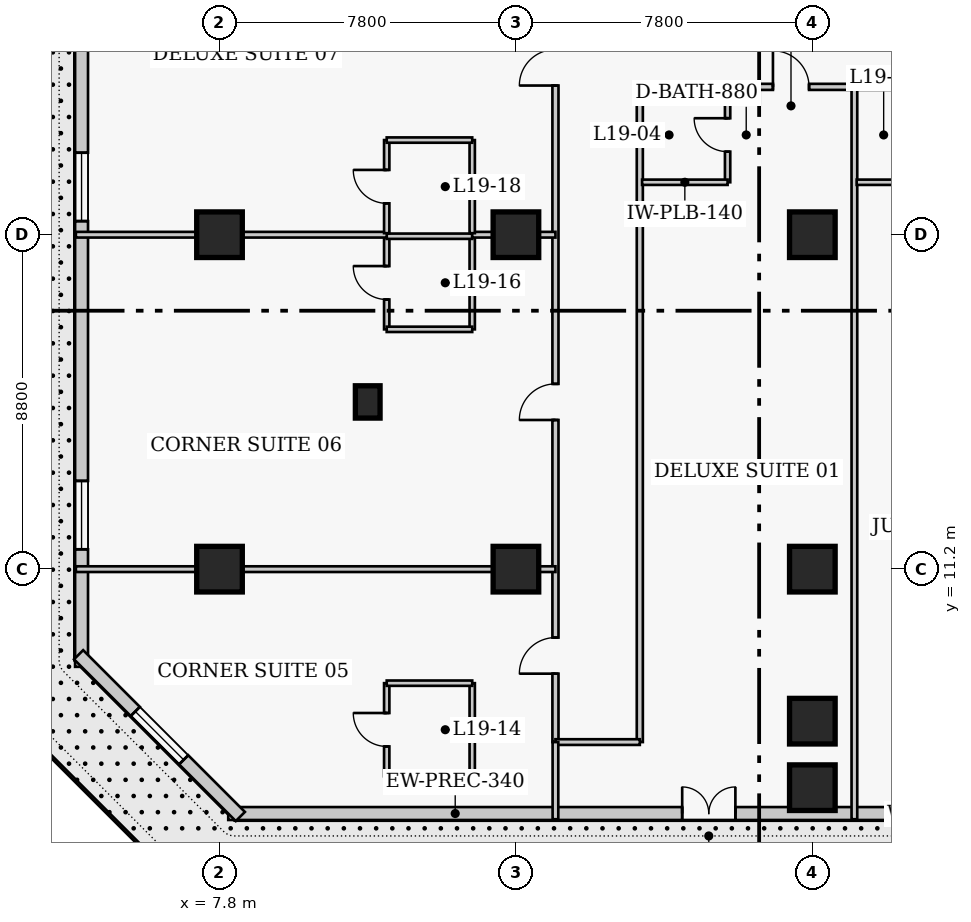
"""IFC4 building model, lengths in metres.
Left out: names, types, materials, properties, quantities, classifications, styles, units other than length and angle.
Written with IfcOpenShell. Run it as: python <this file> out.ifc"""

import sys

from ifc_helpers import new_model, si_unit, direction, frame, frame_2d, origin, origin_2d, place, context, subcontext, project, spatial, rectangle, extrude, element, fill, save


model = new_model("IFC4")
c1 = context("Model", 3, precision=1e-05, world=origin(), true_north=direction((0.0, 1.0)))
c2 = subcontext(c1, "Body", "Model", "MODEL_VIEW")
j1 = project(units=[si_unit("LENGTHUNIT", "METRE"), si_unit("PLANEANGLEUNIT", "RADIAN")], contexts=[c1])
p1 = place(None, origin())
s1 = spatial("IfcSite", under=j1, at=p1, CompositionType="ELEMENT")
p2 = place(p1, origin())
s2 = spatial("IfcBuilding", under=s1, at=p2, CompositionType="ELEMENT")
p3 = place(p2, frame((0.0, 0.0, 80.4)))
s3 = spatial("IfcBuildingStorey", under=s2, at=p3, CompositionType="ELEMENT", Elevation=80.4)
for number, where, z_axis, x_axis in (
    (1, (7.8, 11.2, 0.0), (0.0, 0.0, 1.0), (1.0, 0.0, 0.0)),
    (2, (7.8, 20.0, 0.0), (0.0, 0.0, 1.0), (1.0, 0.0, 0.0)),
    (3, (15.6, 11.2, 0.0), (0.0, 0.0, 1.0), (1.0, 0.0, 0.0)),
    (4, (15.6, 20.0, 0.0), (0.0, 0.0, 1.0), (1.0, 0.0, 0.0)),
    (5, (23.4, 11.2, 0.0), (0.0, 0.0, 1.0), (1.0, 0.0, 0.0)),
    (6, (23.4, 20.0, 0.0), (0.0, 0.0, 1.0), (1.0, 0.0, 0.0)),
    (7, (23.4, 7.2, 0.0), (0.0, 0.0, 1.0), (1.0, 0.0, 0.0)),
    (8, (23.4, 5.45, 0.0), (0.0, 0.0, 1.0), (1.0, 0.0, 0.0)),
):
    element("IfcColumn", number, at=place(p3, frame(where, z_axis=z_axis, x_axis=x_axis)), inside=s3, PredefinedType="COLUMN", context=c2, shape_type="SweptSolid", body=[
        extrude(rectangle(XDim=1.2, YDim=1.2, at=origin_2d()), origin(), (0.0, 0.0, 1.0), 3.8),
    ])
p4 = place(p3, frame((11.7, 15.6, 0.0), z_axis=(0.0, 0.0, 1.0), x_axis=(1.0, 0.0, 0.0)))
e9 = element("IfcColumn", 9, at=p4, inside=s3, PredefinedType="PILASTER", context=c2, shape_type="SweptSolid", body=[
    extrude(rectangle(XDim=0.65, YDim=0.85, at=origin_2d()), origin(), (0.0, 0.0, 1.0), 3.8),
])
p5 = place(p3, frame((8.03, 4.77, 0.0), z_axis=(0.0, 0.0, 1.0), x_axis=(1.0, 0.0, 0.0)))
e10 = element("IfcWall", 10, at=p5, inside=s3, PredefinedType="SOLIDWALL", context=c2, shape_type="SweptSolid", body=[
    extrude(rectangle(XDim=28.29, YDim=0.34, at=frame_2d((14.145, 0.0))), origin(), (0.0, 0.0, 1.0), 3.54),
])
p6 = place(p5, frame((11.945, 0.0, 0.0)))
e11 = element("IfcOpeningElement", 11, at=p6, cuts=e10, PredefinedType="OPENING", context=c2, shape_type="SweptSolid", body=[
    extrude(rectangle(XDim=1.4, YDim=2.15, at=frame_2d((0.7, 1.075))), frame((0.0, 0.18, 0.0), z_axis=(0.0, -1.0, 0.0), x_axis=(1.0, 0.0, 0.0)), (0.0, 0.0, 1.0), 0.36),
])
p7 = place(p5, frame((18.66, 0.0, 0.85)))
e12 = element("IfcOpeningElement", 12, at=p7, cuts=e10, PredefinedType="OPENING", context=c2, shape_type="SweptSolid", body=[
    extrude(rectangle(XDim=1.3, YDim=1.7, at=frame_2d((0.65, 0.85))), frame((0.0, 0.18, 0.0), z_axis=(0.0, -1.0, 0.0), x_axis=(1.0, 0.0, 0.0)), (0.0, 0.0, 1.0), 0.36),
])
p8 = place(p3, frame((4.17, 40.57, 0.0), z_axis=(0.0, 0.0, 1.0), x_axis=(0.0, -1.0, 0.0)))
e13 = element("IfcWall", 13, at=p8, inside=s3, PredefinedType="SOLIDWALL", context=c2, shape_type="SweptSolid", body=[
    extrude(rectangle(XDim=31.94, YDim=0.34, at=frame_2d((15.97, 0.0))), origin(), (0.0, 0.0, 1.0), 3.54),
])
p9 = place(p8, frame((4.242, 0.0, 0.85)))
e14 = element("IfcOpeningElement", 14, at=p9, cuts=e13, PredefinedType="OPENING", context=c2, shape_type="SweptSolid", body=[
    extrude(rectangle(XDim=1.8, YDim=1.8, at=frame_2d((0.9, 0.9))), frame((0.0, 0.18, 0.0), z_axis=(0.0, -1.0, 0.0), x_axis=(1.0, 0.0, 0.0)), (0.0, 0.0, 1.0), 0.36),
])
p10 = place(p8, frame((12.228, 0.0, 0.85)))
e15 = element("IfcOpeningElement", 15, at=p10, cuts=e13, PredefinedType="OPENING", context=c2, shape_type="SweptSolid", body=[
    extrude(rectangle(XDim=1.8, YDim=1.8, at=frame_2d((0.9, 0.9))), frame((0.0, 0.18, 0.0), z_axis=(0.0, -1.0, 0.0), x_axis=(1.0, 0.0, 0.0)), (0.0, 0.0, 1.0), 0.36),
])
p11 = place(p8, frame((18.413, 0.0, 0.85)))
e16 = element("IfcOpeningElement", 16, at=p11, cuts=e13, PredefinedType="OPENING", context=c2, shape_type="SweptSolid", body=[
    extrude(rectangle(XDim=1.8, YDim=1.8, at=frame_2d((0.9, 0.9))), frame((0.0, 0.18, 0.0), z_axis=(0.0, -1.0, 0.0), x_axis=(1.0, 0.0, 0.0)), (0.0, 0.0, 1.0), 0.36),
])
p12 = place(p8, frame((27.048, 0.0, 0.85)))
e17 = element("IfcOpeningElement", 17, at=p12, cuts=e13, PredefinedType="OPENING", context=c2, shape_type="SweptSolid", body=[
    extrude(rectangle(XDim=1.8, YDim=1.8, at=frame_2d((0.9, 0.9))), frame((0.0, 0.18, 0.0), z_axis=(0.0, -1.0, 0.0), x_axis=(1.0, 0.0, 0.0)), (0.0, 0.0, 1.0), 0.36),
])
p13 = place(p3, frame((4.092, 8.948, 0.0), z_axis=(0.0, 0.0, 1.0), x_axis=(0.707106781187, -0.707106781187, 0.0)))
e18 = element("IfcWall", 18, at=p13, inside=s3, PredefinedType="SOLIDWALL", context=c2, shape_type="SweptSolid", body=[
    extrude(rectangle(XDim=6.02, YDim=0.34, at=frame_2d((3.01, 0.0))), origin(), (0.0, 0.0, 1.0), 3.54),
])
p14 = place(p13, frame((2.11, 0.0, 0.85)))
e19 = element("IfcOpeningElement", 19, at=p14, cuts=e18, PredefinedType="OPENING", context=c2, shape_type="SweptSolid", body=[
    extrude(rectangle(XDim=1.8, YDim=1.8, at=frame_2d((0.9, 0.9))), frame((0.0, 0.18, 0.0), z_axis=(0.0, -1.0, 0.0), x_axis=(1.0, 0.0, 0.0)), (0.0, 0.0, 1.0), 0.36),
])
p15 = place(p3, frame((18.8, 23.89, 0.0), z_axis=(0.0, 0.0, 1.0), x_axis=(1.0, 0.0, 0.0)))
e20 = element("IfcWall", 20, at=p15, inside=s3, PredefinedType="PARTITIONING", context=c2, shape_type="SweptSolid", body=[
    extrude(rectangle(XDim=17.0, YDim=0.16, at=frame_2d((8.5, 0.0))), origin(), (0.0, 0.0, 1.0), 3.54),
])
p16 = place(p15, frame((3.563, 0.0, 0.0)))
e21 = element("IfcOpeningElement", 21, at=p16, cuts=e20, PredefinedType="OPENING", context=c2, shape_type="SweptSolid", body=[
    extrude(rectangle(XDim=0.95, YDim=2.1, at=frame_2d((0.475, 1.05))), frame((0.0, 0.09, 0.0), z_axis=(0.0, -1.0, 0.0), x_axis=(1.0, 0.0, 0.0)), (0.0, 0.0, 1.0), 0.18),
])
p17 = place(p15, frame((9.21, 0.0, 0.0)))
e22 = element("IfcOpeningElement", 22, at=p17, cuts=e20, PredefinedType="OPENING", context=c2, shape_type="SweptSolid", body=[
    extrude(rectangle(XDim=0.95, YDim=2.1, at=frame_2d((0.475, 1.05))), frame((0.0, 0.09, 0.0), z_axis=(0.0, -1.0, 0.0), x_axis=(1.0, 0.0, 0.0)), (0.0, 0.0, 1.0), 0.18),
])
p18 = place(p15, frame((13.677, 0.0, 0.0)))
e23 = element("IfcOpeningElement", 23, at=p18, cuts=e20, PredefinedType="OPENING", context=c2, shape_type="SweptSolid", body=[
    extrude(rectangle(XDim=1.0, YDim=2.15, at=frame_2d((0.5, 1.075))), frame((0.0, 0.09, 0.0), z_axis=(0.0, -1.0, 0.0), x_axis=(1.0, 0.0, 0.0)), (0.0, 0.0, 1.0), 0.18),
])
p19 = place(p3, frame((16.64, 6.65, 0.0), z_axis=(0.0, 0.0, 1.0), x_axis=(0.0, 1.0, 0.0)))
e24 = element("IfcWall", 24, at=p19, inside=s3, PredefinedType="PARTITIONING", context=c2, shape_type="SweptSolid", body=[
    extrude(rectangle(XDim=34.0, YDim=0.16, at=frame_2d((17.0, 0.0))), origin(), (0.0, 0.0, 1.0), 3.54),
])
p20 = place(p19, frame((1.8, 0.0, 0.0)))
e25 = element("IfcOpeningElement", 25, at=p20, cuts=e24, PredefinedType="OPENING", context=c2, shape_type="SweptSolid", body=[
    extrude(rectangle(XDim=0.95, YDim=2.1, at=frame_2d((0.475, 1.05))), frame((0.0, 0.09, 0.0), z_axis=(0.0, -1.0, 0.0), x_axis=(1.0, 0.0, 0.0)), (0.0, 0.0, 1.0), 0.18),
])
p21 = place(p19, frame((8.475, 0.0, 0.0)))
e26 = element("IfcOpeningElement", 26, at=p21, cuts=e24, PredefinedType="OPENING", context=c2, shape_type="SweptSolid", body=[
    extrude(rectangle(XDim=0.95, YDim=2.1, at=frame_2d((0.475, 1.05))), frame((0.0, 0.09, 0.0), z_axis=(0.0, -1.0, 0.0), x_axis=(1.0, 0.0, 0.0)), (0.0, 0.0, 1.0), 0.18),
])
p22 = place(p19, frame((17.275, 0.0, 0.0)))
e27 = element("IfcOpeningElement", 27, at=p22, cuts=e24, PredefinedType="OPENING", context=c2, shape_type="SweptSolid", body=[
    extrude(rectangle(XDim=0.95, YDim=2.1, at=frame_2d((0.475, 1.05))), frame((0.0, 0.09, 0.0), z_axis=(0.0, -1.0, 0.0), x_axis=(1.0, 0.0, 0.0)), (0.0, 0.0, 1.0), 0.18),
])
p23 = place(p19, frame((25.675, 0.0, 0.0)))
e28 = element("IfcOpeningElement", 28, at=p23, cuts=e24, PredefinedType="OPENING", context=c2, shape_type="SweptSolid", body=[
    extrude(rectangle(XDim=0.95, YDim=2.1, at=frame_2d((0.475, 1.05))), frame((0.0, 0.09, 0.0), z_axis=(0.0, -1.0, 0.0), x_axis=(1.0, 0.0, 0.0)), (0.0, 0.0, 1.0), 0.18),
])
p24 = place(p19, frame((32.56, 0.0, 0.0)))
e29 = element("IfcOpeningElement", 29, at=p24, cuts=e24, PredefinedType="OPENING", context=c2, shape_type="SweptSolid", body=[
    extrude(rectangle(XDim=1.0, YDim=2.15, at=frame_2d((0.5, 1.075))), frame((0.0, 0.09, 0.0), z_axis=(0.0, -1.0, 0.0), x_axis=(1.0, 0.0, 0.0)), (0.0, 0.0, 1.0), 0.18),
])
p25 = place(p3, frame((18.86, 6.65, 0.0), z_axis=(0.0, 0.0, 1.0), x_axis=(0.0, 1.0, 0.0)))
e30 = element("IfcWall", 30, at=p25, inside=s3, PredefinedType="PARTITIONING", context=c2, shape_type="SweptSolid", body=[
    extrude(rectangle(XDim=17.24, YDim=0.16, at=frame_2d((8.62, 0.0))), origin(), (0.0, 0.0, 1.0), 3.54),
])
p26 = place(p3, frame((16.64, 6.65, 0.0), z_axis=(0.0, 0.0, 1.0), x_axis=(1.0, 0.0, 0.0)))
e31 = element("IfcWall", 31, at=p26, inside=s3, PredefinedType="PARTITIONING", context=c2, shape_type="SweptSolid", body=[
    extrude(rectangle(XDim=2.22, YDim=0.15, at=frame_2d((1.11, 0.0))), origin(), (0.0, 0.0, 1.0), 3.54),
])
p27 = place(p3, frame((21.17, 21.38, 0.0), z_axis=(0.0, 0.0, 1.0), x_axis=(0.0, 1.0, 0.0)))
e32 = element("IfcWall", 32, at=p27, inside=s3, PredefinedType="PLUMBINGWALL", context=c2, shape_type="SweptSolid", body=[
    extrude(rectangle(XDim=2.49, YDim=0.14, at=frame_2d((1.245, 0.0))), origin(), (0.0, 0.0, 1.0), 3.54),
])
p28 = place(p27, frame((0.805, 0.0, 0.0)))
e33 = element("IfcOpeningElement", 33, at=p28, cuts=e32, PredefinedType="OPENING", context=c2, shape_type="SweptSolid", body=[
    extrude(rectangle(XDim=0.88, YDim=2.05, at=frame_2d((0.44, 1.025))), frame((0.0, 0.08, 0.0), z_axis=(0.0, -1.0, 0.0), x_axis=(1.0, 0.0, 0.0)), (0.0, 0.0, 1.0), 0.16),
])
p29 = place(p3, frame((18.92, 21.38, 0.0), z_axis=(0.0, 0.0, 1.0), x_axis=(1.0, 0.0, 0.0)))
e34 = element("IfcWall", 34, at=p29, inside=s3, PredefinedType="PLUMBINGWALL", context=c2, shape_type="SweptSolid", body=[
    extrude(rectangle(XDim=2.25, YDim=0.14, at=frame_2d((1.125, 0.0))), origin(), (0.0, 0.0, 1.0), 3.54),
])
p30 = place(p3, frame((24.507, 4.62, 0.0), z_axis=(0.0, 0.0, 1.0), x_axis=(0.0, 1.0, 0.0)))
e35 = element("IfcWall", 35, at=p30, inside=s3, PredefinedType="PARTITIONING", context=c2, shape_type="SweptSolid", body=[
    extrude(rectangle(XDim=19.27, YDim=0.15, at=frame_2d((9.635, 0.0))), origin(), (0.0, 0.0, 1.0), 3.54),
])
p31 = place(p3, frame((24.567, 21.38, 0.0), z_axis=(0.0, 0.0, 1.0), x_axis=(1.0, 0.0, 0.0)))
e36 = element("IfcWall", 36, at=p31, inside=s3, PredefinedType="PLUMBINGWALL", context=c2, shape_type="SweptSolid", body=[
    extrude(rectangle(XDim=2.25, YDim=0.14, at=frame_2d((1.125, 0.0))), origin(), (0.0, 0.0, 1.0), 3.54),
])
p32 = place(p3, frame((16.64, 4.62, 0.0), z_axis=(0.0, 0.0, 1.0), x_axis=(0.0, 1.0, 0.0)))
e37 = element("IfcWall", 37, at=p32, inside=s3, PredefinedType="PARTITIONING", context=c2, shape_type="SweptSolid", body=[
    extrude(rectangle(XDim=2.03, YDim=0.15, at=frame_2d((1.015, 0.0))), origin(), (0.0, 0.0, 1.0), 3.54),
])
p33 = place(p3, frame((12.2, 5.75, 0.0), z_axis=(0.0, 0.0, 1.0), x_axis=(0.0, 1.0, 0.0)))
e38 = element("IfcWall", 38, at=p33, inside=s3, PredefinedType="PLUMBINGWALL", context=c2, shape_type="SweptSolid", body=[
    extrude(rectangle(XDim=2.45, YDim=0.14, at=frame_2d((1.225, 0.0))), origin(), (0.0, 0.0, 1.0), 3.54),
])
p34 = place(p33, frame((0.785, 0.0, 0.0)))
e39 = element("IfcOpeningElement", 39, at=p34, cuts=e38, PredefinedType="OPENING", context=c2, shape_type="SweptSolid", body=[
    extrude(rectangle(XDim=0.88, YDim=2.05, at=frame_2d((0.44, 1.025))), frame((0.0, 0.08, 0.0), z_axis=(0.0, -1.0, 0.0), x_axis=(1.0, 0.0, 0.0)), (0.0, 0.0, 1.0), 0.16),
])
p35 = place(p3, frame((14.45, 5.75, 0.0), z_axis=(0.0, 0.0, 1.0), x_axis=(0.0, 1.0, 0.0)))
e40 = element("IfcWall", 40, at=p35, inside=s3, PredefinedType="PLUMBINGWALL", context=c2, shape_type="SweptSolid", body=[
    extrude(rectangle(XDim=2.45, YDim=0.14, at=frame_2d((1.225, 0.0))), origin(), (0.0, 0.0, 1.0), 3.54),
])
for number, where, z_axis, x_axis in (
    (41, (12.2, 5.75, 0.0), (0.0, 0.0, 1.0), (1.0, 0.0, 0.0)),
    (42, (12.2, 8.2, 0.0), (0.0, 0.0, 1.0), (1.0, 0.0, 0.0)),
):
    element("IfcWall", number, at=place(p3, frame(where, z_axis=z_axis, x_axis=x_axis)), inside=s3, PredefinedType="PLUMBINGWALL", context=c2, shape_type="SweptSolid", body=[
        extrude(rectangle(XDim=2.25, YDim=0.14, at=frame_2d((1.125, 0.0))), origin(), (0.0, 0.0, 1.0), 3.54),
    ])
p36 = place(p3, frame((4.02, 11.2, 0.0), z_axis=(0.0, 0.0, 1.0), x_axis=(1.0, 0.0, 0.0)))
e43 = element("IfcWall", 43, at=p36, inside=s3, PredefinedType="PARTITIONING", context=c2, shape_type="SweptSolid", body=[
    extrude(rectangle(XDim=12.62, YDim=0.15, at=frame_2d((6.31, 0.0))), origin(), (0.0, 0.0, 1.0), 2.679),
])
p37 = place(p3, frame((12.2, 17.51, 0.0), z_axis=(0.0, 0.0, 1.0), x_axis=(0.0, 1.0, 0.0)))
e44 = element("IfcWall", 44, at=p37, inside=s3, PredefinedType="PLUMBINGWALL", context=c2, shape_type="SweptSolid", body=[
    extrude(rectangle(XDim=2.45, YDim=0.14, at=frame_2d((1.225, 0.0))), origin(), (0.0, 0.0, 1.0), 3.54),
])
p38 = place(p37, frame((0.785, 0.0, 0.0)))
e45 = element("IfcOpeningElement", 45, at=p38, cuts=e44, PredefinedType="OPENING", context=c2, shape_type="SweptSolid", body=[
    extrude(rectangle(XDim=0.88, YDim=2.05, at=frame_2d((0.44, 1.025))), frame((0.0, 0.08, 0.0), z_axis=(0.0, -1.0, 0.0), x_axis=(1.0, 0.0, 0.0)), (0.0, 0.0, 1.0), 0.16),
])
p39 = place(p3, frame((14.45, 17.51, 0.0), z_axis=(0.0, 0.0, 1.0), x_axis=(0.0, 1.0, 0.0)))
e46 = element("IfcWall", 46, at=p39, inside=s3, PredefinedType="PLUMBINGWALL", context=c2, shape_type="SweptSolid", body=[
    extrude(rectangle(XDim=2.45, YDim=0.14, at=frame_2d((1.225, 0.0))), origin(), (0.0, 0.0, 1.0), 3.54),
])
p40 = place(p3, frame((12.2, 17.51, 0.0), z_axis=(0.0, 0.0, 1.0), x_axis=(1.0, 0.0, 0.0)))
e47 = element("IfcWall", 47, at=p40, inside=s3, PredefinedType="PLUMBINGWALL", context=c2, shape_type="SweptSolid", body=[
    extrude(rectangle(XDim=2.25, YDim=0.14, at=frame_2d((1.125, 0.0))), origin(), (0.0, 0.0, 1.0), 3.54),
])
p41 = place(p3, frame((12.2, 19.96, 0.0), z_axis=(0.0, 0.0, 1.0), x_axis=(1.0, 0.0, 0.0)))
e48 = element("IfcWall", 48, at=p41, inside=s3, PredefinedType="PLUMBINGWALL", context=c2, shape_type="SweptSolid", body=[
    extrude(rectangle(XDim=2.25, YDim=0.14, at=frame_2d((1.125, 0.0))), origin(), (0.0, 0.0, 1.0), 2.679),
])
p42 = place(p3, frame((4.02, 20.0, 0.0), z_axis=(0.0, 0.0, 1.0), x_axis=(1.0, 0.0, 0.0)))
e49 = element("IfcWall", 49, at=p42, inside=s3, PredefinedType="PARTITIONING", context=c2, shape_type="SweptSolid", body=[
    extrude(rectangle(XDim=8.18, YDim=0.15, at=frame_2d((4.09, 0.0))), origin(), (0.0, 0.0, 1.0), 2.679),
])
p43 = place(p3, frame((14.45, 20.0, 0.0), z_axis=(0.0, 0.0, 1.0), x_axis=(1.0, 0.0, 0.0)))
e50 = element("IfcWall", 50, at=p43, inside=s3, PredefinedType="PARTITIONING", context=c2, shape_type="SweptSolid", body=[
    extrude(rectangle(XDim=2.19, YDim=0.15, at=frame_2d((1.095, 0.0))), origin(), (0.0, 0.0, 1.0), 2.679),
])
p44 = place(p3, frame((12.2, 20.04, 0.0), z_axis=(0.0, 0.0, 1.0), x_axis=(0.0, 1.0, 0.0)))
e51 = element("IfcWall", 51, at=p44, inside=s3, PredefinedType="PLUMBINGWALL", context=c2, shape_type="SweptSolid", body=[
    extrude(rectangle(XDim=2.45, YDim=0.14, at=frame_2d((1.225, 0.0))), origin(), (0.0, 0.0, 1.0), 3.54),
])
p45 = place(p44, frame((0.785, 0.0, 0.0)))
e52 = element("IfcOpeningElement", 52, at=p45, cuts=e51, PredefinedType="OPENING", context=c2, shape_type="SweptSolid", body=[
    extrude(rectangle(XDim=0.88, YDim=2.05, at=frame_2d((0.44, 1.025))), frame((0.0, 0.08, 0.0), z_axis=(0.0, -1.0, 0.0), x_axis=(1.0, 0.0, 0.0)), (0.0, 0.0, 1.0), 0.16),
])
p46 = place(p3, frame((14.45, 20.04, 0.0), z_axis=(0.0, 0.0, 1.0), x_axis=(0.0, 1.0, 0.0)))
e53 = element("IfcWall", 53, at=p46, inside=s3, PredefinedType="PLUMBINGWALL", context=c2, shape_type="SweptSolid", body=[
    extrude(rectangle(XDim=2.45, YDim=0.14, at=frame_2d((1.225, 0.0))), origin(), (0.0, 0.0, 1.0), 3.54),
])
p47 = place(p3, frame((12.2, 22.49, 0.0), z_axis=(0.0, 0.0, 1.0), x_axis=(1.0, 0.0, 0.0)))
e54 = element("IfcWall", 54, at=p47, inside=s3, PredefinedType="PLUMBINGWALL", context=c2, shape_type="SweptSolid", body=[
    extrude(rectangle(XDim=2.25, YDim=0.14, at=frame_2d((1.125, 0.0))), origin(), (0.0, 0.0, 1.0), 3.54),
])
p48 = place(p6, origin())
e55 = element("IfcDoor", 55, at=p48, inside=s3, OperationType="DOUBLE_DOOR_SINGLE_SWING", PredefinedType="DOOR", context=c2, shape_type="SweptSolid", body=[
    extrude(rectangle(XDim=1.4, YDim=2.15, at=frame_2d((0.7, 1.075))), frame((0.0, 0.025, 0.0), z_axis=(0.0, -1.0, 0.0), x_axis=(1.0, 0.0, 0.0)), (0.0, 0.0, 1.0), 0.05),
])
fill(e11, e55)
p49 = place(p11, origin())
e56 = element("IfcWindow", 56, at=p49, inside=s3, PartitioningType="SINGLE_PANEL", PredefinedType="WINDOW", context=c2, shape_type="SweptSolid", body=[
    extrude(rectangle(XDim=1.8, YDim=1.8, at=frame_2d((0.9, 0.9))), frame((0.0, 0.03, 0.0), z_axis=(0.0, -1.0, 0.0), x_axis=(1.0, 0.0, 0.0)), (0.0, 0.0, 1.0), 0.06),
])
fill(e16, e56)
p50 = place(p12, origin())
e57 = element("IfcWindow", 57, at=p50, inside=s3, PartitioningType="SINGLE_PANEL", PredefinedType="WINDOW", context=c2, shape_type="SweptSolid", body=[
    extrude(rectangle(XDim=1.8, YDim=1.8, at=frame_2d((0.9, 0.9))), frame((0.0, 0.03, 0.0), z_axis=(0.0, -1.0, 0.0), x_axis=(1.0, 0.0, 0.0)), (0.0, 0.0, 1.0), 0.06),
])
fill(e17, e57)
p51 = place(p14, origin())
e58 = element("IfcWindow", 58, at=p51, inside=s3, PartitioningType="SINGLE_PANEL", PredefinedType="WINDOW", context=c2, shape_type="SweptSolid", body=[
    extrude(rectangle(XDim=1.8, YDim=1.8, at=frame_2d((0.9, 0.9))), frame((0.0, 0.03, 0.0), z_axis=(0.0, -1.0, 0.0), x_axis=(1.0, 0.0, 0.0)), (0.0, 0.0, 1.0), 0.06),
])
fill(e19, e58)
p52 = place(p28, origin())
e59 = element("IfcDoor", 59, at=p52, inside=s3, OperationType="SINGLE_SWING_RIGHT", PredefinedType="DOOR", context=c2, shape_type="SweptSolid", body=[
    extrude(rectangle(XDim=0.88, YDim=2.05, at=frame_2d((0.44, 1.025))), frame((0.0, 0.025, 0.0), z_axis=(0.0, -1.0, 0.0), x_axis=(1.0, 0.0, 0.0)), (0.0, 0.0, 1.0), 0.05),
])
fill(e33, e59)
p53 = place(p16, origin())
e60 = element("IfcDoor", 60, at=p53, inside=s3, OperationType="SINGLE_SWING_LEFT", PredefinedType="DOOR", context=c2, shape_type="SweptSolid", body=[
    extrude(rectangle(XDim=0.95, YDim=2.1, at=frame_2d((0.475, 1.05))), frame((0.0, 0.025, 0.0), z_axis=(0.0, -1.0, 0.0), x_axis=(1.0, 0.0, 0.0)), (0.0, 0.0, 1.0), 0.05),
])
fill(e21, e60)
p54 = place(p34, origin())
e61 = element("IfcDoor", 61, at=p54, inside=s3, OperationType="SINGLE_SWING_RIGHT", PredefinedType="DOOR", context=c2, shape_type="SweptSolid", body=[
    extrude(rectangle(XDim=0.88, YDim=2.05, at=frame_2d((0.44, 1.025))), frame((0.0, 0.025, 0.0), z_axis=(0.0, -1.0, 0.0), x_axis=(1.0, 0.0, 0.0)), (0.0, 0.0, 1.0), 0.05),
])
fill(e39, e61)
p55 = place(p20, origin())
e62 = element("IfcDoor", 62, at=p55, inside=s3, OperationType="SINGLE_SWING_LEFT", PredefinedType="DOOR", context=c2, shape_type="SweptSolid", body=[
    extrude(rectangle(XDim=0.95, YDim=2.1, at=frame_2d((0.475, 1.05))), frame((0.0, 0.025, 0.0), z_axis=(0.0, -1.0, 0.0), x_axis=(1.0, 0.0, 0.0)), (0.0, 0.0, 1.0), 0.05),
])
fill(e25, e62)
p56 = place(p38, origin())
e63 = element("IfcDoor", 63, at=p56, inside=s3, OperationType="SINGLE_SWING_RIGHT", PredefinedType="DOOR", context=c2, shape_type="SweptSolid", body=[
    extrude(rectangle(XDim=0.88, YDim=2.05, at=frame_2d((0.44, 1.025))), frame((0.0, 0.025, 0.0), z_axis=(0.0, -1.0, 0.0), x_axis=(1.0, 0.0, 0.0)), (0.0, 0.0, 1.0), 0.05),
])
fill(e45, e63)
p57 = place(p21, origin())
e64 = element("IfcDoor", 64, at=p57, inside=s3, OperationType="SINGLE_SWING_LEFT", PredefinedType="DOOR", context=c2, shape_type="SweptSolid", body=[
    extrude(rectangle(XDim=0.95, YDim=2.1, at=frame_2d((0.475, 1.05))), frame((0.0, 0.025, 0.0), z_axis=(0.0, -1.0, 0.0), x_axis=(1.0, 0.0, 0.0)), (0.0, 0.0, 1.0), 0.05),
])
fill(e26, e64)
p58 = place(p45, origin())
e65 = element("IfcDoor", 65, at=p58, inside=s3, OperationType="SINGLE_SWING_RIGHT", PredefinedType="DOOR", context=c2, shape_type="SweptSolid", body=[
    extrude(rectangle(XDim=0.88, YDim=2.05, at=frame_2d((0.44, 1.025))), frame((0.0, 0.025, 0.0), z_axis=(0.0, -1.0, 0.0), x_axis=(1.0, 0.0, 0.0)), (0.0, 0.0, 1.0), 0.05),
])
fill(e52, e65)
p59 = place(p22, origin())
e66 = element("IfcDoor", 66, at=p59, inside=s3, OperationType="SINGLE_SWING_LEFT", PredefinedType="DOOR", context=c2, shape_type="SweptSolid", body=[
    extrude(rectangle(XDim=0.95, YDim=2.1, at=frame_2d((0.475, 1.05))), frame((0.0, 0.025, 0.0), z_axis=(0.0, -1.0, 0.0), x_axis=(1.0, 0.0, 0.0)), (0.0, 0.0, 1.0), 0.05),
])
fill(e27, e66)
save(model, sys.argv[1])
